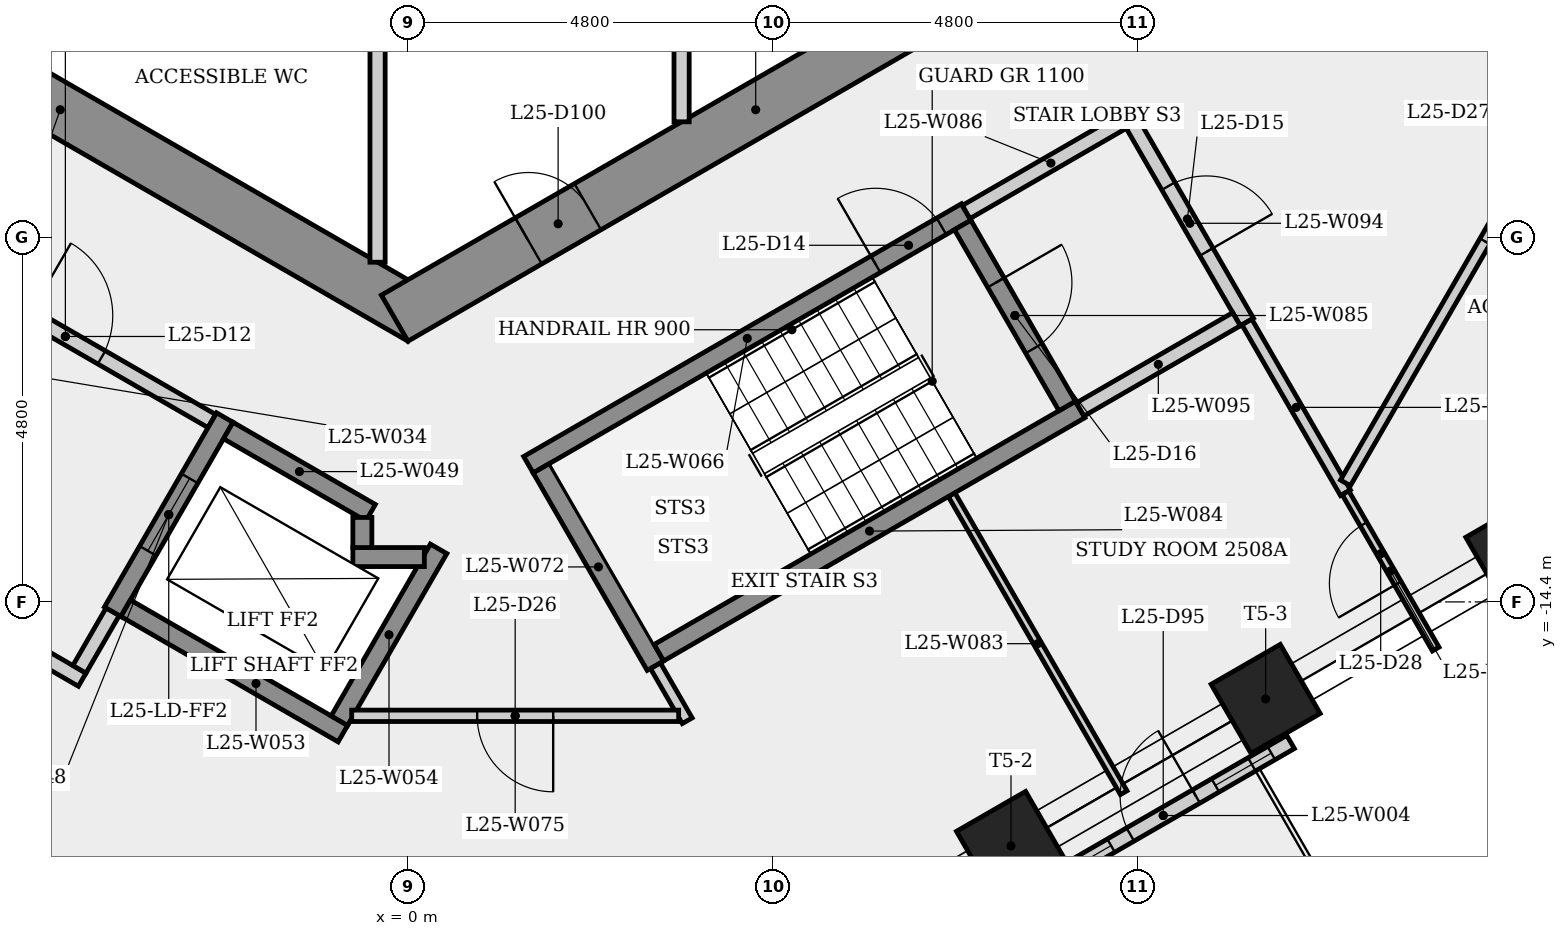
"""IFC4 building model, lengths in metres.
Left out: names, types, materials, properties, quantities, classifications, styles, units other than length and angle.
Written with IfcOpenShell. Run it as: python <this file> out.ifc"""

import sys

from ifc_helpers import new_model, si_unit, direction, frame, frame_2d, origin, origin_2d, place, context, subcontext, project, spatial, rectangle, extrude, element, fill, save


model = new_model("IFC4")
c1 = context("Model", 3, precision=1e-05, world=origin(), true_north=direction((0.0, 1.0)))
c2 = subcontext(c1, "Body", "Model", "MODEL_VIEW")
j1 = project(units=[si_unit("LENGTHUNIT", "METRE"), si_unit("PLANEANGLEUNIT", "RADIAN")], contexts=[c1])
p1 = place(None, origin())
s1 = spatial("IfcSite", under=j1, at=p1, CompositionType="ELEMENT")
p2 = place(p1, origin())
s2 = spatial("IfcBuilding", under=s1, at=p2, CompositionType="ELEMENT")
p3 = place(p2, frame((0.0, 0.0, 96.7)))
s3 = spatial("IfcBuildingStorey", under=s2, at=p3, CompositionType="ELEMENT", Elevation=96.7)
p4 = place(p3, frame((-9.325, -5.182, 0.0), z_axis=(0.0, 0.0, 1.0), x_axis=(0.866023993627, -0.500002442456, 0.0)))
e1 = element("IfcWall", 1, at=p4, inside=s3, PredefinedType="SHEAR", context=c2, shape_type="SweptSolid", body=[
    extrude(rectangle(XDim=10.97, YDim=0.7, at=frame_2d((5.485, 0.0))), origin(), (0.0, 0.0, 1.0), 3.4),
])
p5 = place(p4, frame((3.164, 0.0, 0.0)))
e2 = element("IfcOpeningElement", 2, at=p5, cuts=e1, PredefinedType="OPENING", context=c2, shape_type="SweptSolid", body=[
    extrude(rectangle(XDim=0.9, YDim=2.1, at=frame_2d((0.45, 1.05))), frame((0.0, 0.36, 0.0), z_axis=(0.0, -1.0, 0.0), x_axis=(1.0, 0.0, 0.0)), (0.0, 0.0, 1.0), 0.72),
])
p6 = place(p3, frame((-0.175, -10.667, 0.0), z_axis=(0.0, 0.0, 1.0), x_axis=(0.866023993627, 0.500002442456, 0.0)))
e3 = element("IfcWall", 3, at=p6, inside=s3, PredefinedType="SHEAR", context=c2, shape_type="SweptSolid", body=[
    extrude(rectangle(XDim=10.97, YDim=0.7, at=frame_2d((5.485, 0.0))), origin(), (0.0, 0.0, 1.0), 3.4),
])
p7 = place(p6, frame((2.033, 0.0, 0.0)))
e4 = element("IfcOpeningElement", 4, at=p7, cuts=e3, PredefinedType="OPENING", context=c2, shape_type="SweptSolid", body=[
    extrude(rectangle(XDim=0.9, YDim=2.1, at=frame_2d((0.45, 1.05))), frame((0.0, 0.36, 0.0), z_axis=(0.0, -1.0, 0.0), x_axis=(1.0, 0.0, 0.0)), (0.0, 0.0, 1.0), 0.72),
])
p8 = place(p6, frame((8.754, 0.0, 0.0)))
e5 = element("IfcOpeningElement", 5, at=p8, cuts=e3, PredefinedType="OPENING", context=c2, shape_type="SweptSolid", body=[
    extrude(rectangle(XDim=0.9, YDim=2.1, at=frame_2d((0.45, 1.05))), frame((0.0, 0.36, 0.0), z_axis=(0.0, -1.0, 0.0), x_axis=(1.0, 0.0, 0.0)), (0.0, 0.0, 1.0), 0.72),
])
for number, where, z_axis, x_axis in (
    (6, (7.934, -17.611, 0.0), (0.0, 0.0, 1.0), (0.5, -0.866, 0.0)),
    (7, (11.284, -15.677, 0.0), (0.0, 0.0, 1.0), (0.5, -0.866, 0.0)),
    (8, (14.635, -13.742, 0.0), (0.0, 0.0, 1.0), (0.5, -0.866, 0.0)),
):
    element("IfcColumn", number, at=place(p3, frame(where, z_axis=z_axis, x_axis=x_axis)), inside=s3, PredefinedType="COLUMN", context=c2, shape_type="SweptSolid", body=[
        extrude(rectangle(XDim=1.05, YDim=1.05, at=origin_2d()), origin(), (0.0, 0.0, 1.0), 3.4),
    ])
p9 = place(p3, frame((8.261, -18.178, 0.0), z_axis=(0.0, 0.0, 1.0), x_axis=(0.866040571269, 0.499973728225, 0.0)))
e9 = element("IfcWall", 9, at=p9, inside=s3, PredefinedType="SOLIDWALL", context=c2, shape_type="SweptSolid", body=[
    extrude(rectangle(XDim=3.869, YDim=0.2, at=frame_2d((1.935, 0.0))), origin(), (0.0, 0.0, 1.0), 3.4),
])
p10 = place(p9, frame((1.435, 0.0, 0.0)))
e10 = element("IfcOpeningElement", 10, at=p10, cuts=e9, PredefinedType="OPENING", context=c2, shape_type="SweptSolid", body=[
    extrude(rectangle(XDim=1.0, YDim=2.4, at=frame_2d((0.5, 1.2))), frame((0.0, 0.11, 0.0), z_axis=(0.0, -1.0, 0.0), x_axis=(1.0, 0.0, 0.0)), (0.0, 0.0, 1.0), 0.22),
])
p11 = place(p9, frame((0.292, 0.0, 0.9)))
e11 = element("IfcOpeningElement", 11, at=p11, cuts=e9, PredefinedType="OPENING", context=c2, shape_type="SweptSolid", body=[
    extrude(rectangle(XDim=0.85, YDim=1.5, at=frame_2d((0.425, 0.75))), frame((0.0, 0.11, 0.0), z_axis=(0.0, -1.0, 0.0), x_axis=(1.0, 0.0, 0.0)), (0.0, 0.0, 1.0), 0.22),
])
p12 = place(p9, frame((2.727, 0.0, 0.9)))
e12 = element("IfcOpeningElement", 12, at=p12, cuts=e9, PredefinedType="OPENING", context=c2, shape_type="SweptSolid", body=[
    extrude(rectangle(XDim=0.85, YDim=1.5, at=frame_2d((0.425, 0.75))), frame((0.0, 0.11, 0.0), z_axis=(0.0, -1.0, 0.0), x_axis=(1.0, 0.0, 0.0)), (0.0, 0.0, 1.0), 0.22),
])
p13 = place(p3, frame((-6.435, -9.795, 0.0), z_axis=(0.0, 0.0, 1.0), x_axis=(0.866012907634, -0.500021643343, 0.0)))
e13 = element("IfcWall", 13, at=p13, inside=s3, PredefinedType="PARTITIONING", context=c2, shape_type="SweptSolid", body=[
    extrude(rectangle(XDim=4.45, YDim=0.2, at=frame_2d((2.225, 0.0))), origin(), (0.0, 0.0, 1.0), 3.05),
])
p14 = place(p13, frame((1.675, 0.0, 0.0)))
e14 = element("IfcOpeningElement", 14, at=p14, cuts=e13, PredefinedType="OPENING", context=c2, shape_type="SweptSolid", body=[
    extrude(rectangle(XDim=1.1, YDim=2.1, at=frame_2d((0.55, 1.05))), frame((0.0, 0.11, 0.0), z_axis=(0.0, -1.0, 0.0), x_axis=(1.0, 0.0, 0.0)), (0.0, 0.0, 1.0), 0.22),
])
p15 = place(p3, frame((-4.286, -15.423, 0.0), z_axis=(0.0, 0.0, 1.0), x_axis=(-0.866025371046, 0.500000056704, 0.0)))
e15 = element("IfcWall", 15, at=p15, inside=s3, PredefinedType="PARTITIONING", context=c2, shape_type="SweptSolid", body=[
    extrude(rectangle(XDim=1.7, YDim=0.2, at=frame_2d((0.85, 0.0))), origin(), (0.0, 0.0, 1.0), 3.05),
])
p16 = place(p3, frame((-3.885, -14.529, 0.0), z_axis=(0.0, 0.0, 1.0), x_axis=(-0.499859285417, -0.866106630146, 0.0)))
e16 = element("IfcWall", 16, at=p16, inside=s3, PredefinedType="PARTITIONING", context=c2, shape_type="SweptSolid", body=[
    extrude(rectangle(XDim=0.875, YDim=0.2, at=frame_2d((0.438, 0.0))), origin(), (0.0, 0.0, 1.0), 3.05),
])
p17 = place(p3, frame((-2.41, -11.974, 0.0), z_axis=(0.0, 0.0, 1.0), x_axis=(-0.500001826776, -0.866024349092, 0.0)))
e17 = element("IfcWall", 17, at=p17, inside=s3, PredefinedType="SHEAR", context=c2, shape_type="SweptSolid", body=[
    extrude(rectangle(XDim=2.95, YDim=0.25, at=frame_2d((1.475, 0.0))), origin(), (0.0, 0.0, 1.0), 3.05),
])
p18 = place(p17, frame((0.925, 0.0, 0.0)))
e18 = element("IfcOpeningElement", 18, at=p18, cuts=e17, PredefinedType="OPENING", context=c2, shape_type="SweptSolid", body=[
    extrude(rectangle(XDim=1.1, YDim=2.1, at=frame_2d((0.55, 1.05))), frame((0.0, 0.135, 0.0), z_axis=(0.0, -1.0, 0.0), x_axis=(1.0, 0.0, 0.0)), (0.0, 0.0, 1.0), 0.27),
])
p19 = place(p3, frame((-2.364, -12.145, 0.0), z_axis=(0.0, 0.0, 1.0), x_axis=(0.86603892542, -0.499976579108, 0.0)))
e19 = element("IfcWall", 19, at=p19, inside=s3, PredefinedType="SHEAR", context=c2, shape_type="SweptSolid", body=[
    extrude(rectangle(XDim=2.162, YDim=0.25, at=frame_2d((1.081, 0.0))), origin(), (0.0, 0.0, 1.0), 3.05),
])
p20 = place(p3, frame((-0.856, -16.133, 0.0), z_axis=(0.0, 0.0, 1.0), x_axis=(-0.866021716278, 0.500006386895, 0.0)))
e20 = element("IfcWall", 20, at=p20, inside=s3, PredefinedType="SHEAR", context=c2, shape_type="SweptSolid", body=[
    extrude(rectangle(XDim=3.3, YDim=0.25, at=frame_2d((1.65, 0.0))), origin(), (0.0, 0.0, 1.0), 3.05),
])
p21 = place(p3, frame((-0.902, -15.962, 0.0), z_axis=(0.0, 0.0, 1.0), x_axis=(0.499981517636, 0.866036074319, 0.0)))
e21 = element("IfcWall", 21, at=p21, inside=s3, PredefinedType="SHEAR", context=c2, shape_type="SweptSolid", body=[
    extrude(rectangle(XDim=2.61, YDim=0.25, at=frame_2d((1.305, 0.0))), origin(), (0.0, 0.0, 1.0), 3.05),
])
p22 = place(p3, frame((-0.725, -13.81, 0.0), z_axis=(0.0, 0.0, 1.0), x_axis=(1.0, 0.0, 0.0)))
e22 = element("IfcWall", 22, at=p22, inside=s3, PredefinedType="SHEAR", context=c2, shape_type="SweptSolid", body=[
    extrude(rectangle(XDim=0.941, YDim=0.25, at=frame_2d((0.47, 0.0))), origin(), (0.0, 0.0, 1.0), 3.4),
])
p23 = place(p3, frame((-0.6, -13.289, 0.0), z_axis=(0.0, 0.0, 1.0), x_axis=(0.0, -1.0, 0.0)))
e23 = element("IfcWall", 23, at=p23, inside=s3, PredefinedType="SHEAR", context=c2, shape_type="SweptSolid", body=[
    extrude(rectangle(XDim=0.396, YDim=0.25, at=frame_2d((0.198, 0.0))), origin(), (0.0, 0.0, 1.0), 3.4),
])
p24 = place(p3, frame((-0.4, -5.275, 0.0), z_axis=(0.0, 0.0, 1.0), x_axis=(0.0, -1.0, 0.0)))
e24 = element("IfcWall", 24, at=p24, inside=s3, PredefinedType="PARTITIONING", context=c2, shape_type="SweptSolid", body=[
    extrude(rectangle(XDim=4.656, YDim=0.2, at=frame_2d((2.328, 0.0))), origin(), (0.0, 0.0, 1.0), 3.05),
])
p25 = place(p3, frame((1.585, -12.595, 0.0), z_axis=(0.0, 0.0, 1.0), x_axis=(0.866036417653, 0.499980922934, 0.0)))
e25 = element("IfcWall", 25, at=p25, inside=s3, PredefinedType="SHEAR", context=c2, shape_type="SweptSolid", body=[
    extrude(rectangle(XDim=6.65, YDim=0.25, at=frame_2d((3.325, 0.0))), origin(), (0.0, 0.0, 1.0), 3.05),
])
p26 = place(p25, frame((5.275, 0.0, 0.0)))
e26 = element("IfcOpeningElement", 26, at=p26, cuts=e25, PredefinedType="OPENING", context=c2, shape_type="SweptSolid", body=[
    extrude(rectangle(XDim=1.0, YDim=2.1, at=frame_2d((0.5, 1.05))), frame((0.0, 0.135, 0.0), z_axis=(0.0, -1.0, 0.0), x_axis=(1.0, 0.0, 0.0)), (0.0, 0.0, 1.0), 0.27),
])
p27 = place(p3, frame((3.256, -15.239, 0.0), z_axis=(0.0, 0.0, 1.0), x_axis=(0.499840262897, -0.866117608404, 0.0)))
e27 = element("IfcWall", 27, at=p27, inside=s3, PredefinedType="PARTITIONING", context=c2, shape_type="SweptSolid", body=[
    extrude(rectangle(XDim=0.837, YDim=0.15, at=frame_2d((0.418, 0.0))), origin(), (0.0, 0.0, 1.0), 3.05),
])
p28 = place(p3, frame((3.256, -15.239, 0.0), z_axis=(0.0, 0.0, 1.0), x_axis=(-0.50002537861, 0.866010750942, 0.0)))
e28 = element("IfcWall", 28, at=p28, inside=s3, PredefinedType="SHEAR", context=c2, shape_type="SweptSolid", body=[
    extrude(rectangle(XDim=3.0, YDim=0.25, at=frame_2d((1.5, 0.0))), origin(), (0.0, 0.0, 1.0), 3.05),
])
p29 = place(p3, frame((3.6, -5.275, 0.0), z_axis=(0.0, 0.0, 1.0), x_axis=(0.0, -1.0, 0.0)))
e29 = element("IfcWall", 29, at=p29, inside=s3, PredefinedType="PARTITIONING", context=c2, shape_type="SweptSolid", body=[
    extrude(rectangle(XDim=2.808, YDim=0.2, at=frame_2d((1.404, 0.0))), origin(), (0.0, 0.0, 1.0), 3.05),
])
p30 = place(p3, frame((3.562, -15.899, 0.0), z_axis=(0.0, 0.0, 1.0), x_axis=(-1.0, 0.0, 0.0)))
e30 = element("IfcWall", 30, at=p30, inside=s3, PredefinedType="PARTITIONING", context=c2, shape_type="SweptSolid", body=[
    extrude(rectangle(XDim=4.302, YDim=0.15, at=frame_2d((2.151, 0.0))), origin(), (0.0, 0.0, 1.0), 3.05),
])
p31 = place(p30, frame((1.651, 0.0, 0.0)))
e31 = element("IfcOpeningElement", 31, at=p31, cuts=e30, PredefinedType="OPENING", context=c2, shape_type="SweptSolid", body=[
    extrude(rectangle(XDim=1.0, YDim=2.1, at=frame_2d((0.5, 1.05))), frame((0.0, 0.085, 0.0), z_axis=(0.0, -1.0, 0.0), x_axis=(1.0, 0.0, 0.0)), (0.0, 0.0, 1.0), 0.17),
])
p32 = place(p3, frame((7.153, -12.989, 0.0), z_axis=(0.0, 0.0, 1.0), x_axis=(0.500000914898, -0.866024875567, 0.0)))
e32 = element("IfcWall", 32, at=p32, inside=s3, PredefinedType="PARTITIONING", context=c2, shape_type="SweptSolid", body=[
    extrude(rectangle(XDim=4.528, YDim=0.1, at=frame_2d((2.264, 0.0))), origin(), (0.0, 0.0, 1.0), 3.05),
])
p33 = place(p3, frame((3.301, -15.068, 0.0), z_axis=(0.0, 0.0, 1.0), x_axis=(0.866035036182, 0.499983315828, 0.0)))
e33 = element("IfcWall", 33, at=p33, inside=s3, PredefinedType="SHEAR", context=c2, shape_type="SweptSolid", body=[
    extrude(rectangle(XDim=6.4, YDim=0.25, at=frame_2d((3.2, 0.0))), origin(), (0.0, 0.0, 1.0), 3.05),
])
p34 = place(p3, frame((7.298, -9.441, 0.0), z_axis=(0.0, 0.0, 1.0), x_axis=(0.500034990121, -0.866005201286, 0.0)))
e34 = element("IfcWall", 34, at=p34, inside=s3, PredefinedType="SHEAR", context=c2, shape_type="SweptSolid", body=[
    extrude(rectangle(XDim=2.75, YDim=0.25, at=frame_2d((1.375, 0.0))), origin(), (0.0, 0.0, 1.0), 3.05),
])
p35 = place(p34, frame((0.875, 0.0, 0.0)))
e35 = element("IfcOpeningElement", 35, at=p35, cuts=e34, PredefinedType="OPENING", context=c2, shape_type="SweptSolid", body=[
    extrude(rectangle(XDim=1.0, YDim=2.1, at=frame_2d((0.5, 1.05))), frame((0.0, 0.135, 0.0), z_axis=(0.0, -1.0, 0.0), x_axis=(1.0, 0.0, 0.0)), (0.0, 0.0, 1.0), 0.27),
])
p36 = place(p3, frame((7.344, -9.27, 0.0), z_axis=(0.0, 0.0, 1.0), x_axis=(0.866005588531, 0.500034319456, 0.0)))
e36 = element("IfcWall", 36, at=p36, inside=s3, PredefinedType="PARTITIONING", context=c2, shape_type="SweptSolid", body=[
    extrude(rectangle(XDim=2.575, YDim=0.2, at=frame_2d((1.288, 0.0))), origin(), (0.0, 0.0, 1.0), 3.05),
])
p37 = place(p3, frame((9.537, -8.119, 0.0), z_axis=(0.0, 0.0, 1.0), x_axis=(0.499990139034, -0.866031096941, 0.0)))
e37 = element("IfcWall", 37, at=p37, inside=s3, PredefinedType="PARTITIONING", context=c2, shape_type="SweptSolid", body=[
    extrude(rectangle(XDim=3.0, YDim=0.2, at=frame_2d((1.5, 0.0))), origin(), (0.0, 0.0, 1.0), 3.05),
])
p38 = place(p37, frame((0.935, 0.0, 0.0)))
e38 = element("IfcOpeningElement", 38, at=p38, cuts=e37, PredefinedType="OPENING", context=c2, shape_type="SweptSolid", body=[
    extrude(rectangle(XDim=1.0, YDim=2.1, at=frame_2d((0.5, 1.05))), frame((0.0, 0.11, 0.0), z_axis=(0.0, -1.0, 0.0), x_axis=(1.0, 0.0, 0.0)), (0.0, 0.0, 1.0), 0.22),
])
p39 = place(p3, frame((10.901, -10.681, 0.0), z_axis=(0.0, 0.0, 1.0), x_axis=(-0.866007538022, -0.500030943131, 0.0)))
e39 = element("IfcWall", 39, at=p39, inside=s3, PredefinedType="PARTITIONING", context=c2, shape_type="SweptSolid", body=[
    extrude(rectangle(XDim=2.375, YDim=0.2, at=frame_2d((1.188, 0.0))), origin(), (0.0, 0.0, 1.0), 3.05),
])
p40 = place(p3, frame((12.334, -12.964, 0.0), z_axis=(0.0, 0.0, 1.0), x_axis=(-0.499974977939, 0.866039849796, 0.0)))
e40 = element("IfcWall", 40, at=p40, inside=s3, PredefinedType="PARTITIONING", context=c2, shape_type="SweptSolid", body=[
    extrude(rectangle(XDim=2.594, YDim=0.15, at=frame_2d((1.297, 0.0))), origin(), (0.0, 0.0, 1.0), 3.05),
])
p41 = place(p3, frame((13.522, -15.021, 0.0), z_axis=(0.0, 0.0, 1.0), x_axis=(-0.500030943131, 0.866007538022, 0.0)))
e41 = element("IfcWall", 41, at=p41, inside=s3, PredefinedType="PARTITIONING", context=c2, shape_type="SweptSolid", body=[
    extrude(rectangle(XDim=2.375, YDim=0.1, at=frame_2d((1.188, 0.0))), origin(), (0.0, 0.0, 1.0), 3.05),
])
p42 = place(p41, frame((0.998, 0.0, 0.0)))
e42 = element("IfcOpeningElement", 42, at=p42, cuts=e41, PredefinedType="OPENING", context=c2, shape_type="SweptSolid", body=[
    extrude(rectangle(XDim=0.9, YDim=2.1, at=frame_2d((0.45, 1.05))), frame((0.0, 0.06, 0.0), z_axis=(0.0, -1.0, 0.0), x_axis=(1.0, 0.0, 0.0)), (0.0, 0.0, 1.0), 0.12),
])
p43 = place(p3, frame((16.504, -5.611, 0.0), z_axis=(0.0, 0.0, 1.0), x_axis=(-0.499992746786, -0.866029591389, 0.0)))
e43 = element("IfcWall", 43, at=p43, inside=s3, PredefinedType="PARTITIONING", context=c2, shape_type="SweptSolid", body=[
    extrude(rectangle(XDim=8.34, YDim=0.15, at=frame_2d((4.17, 0.0))), origin(), (0.0, 0.0, 1.0), 3.05),
])
p44 = place(p43, frame((3.67, 0.0, 0.0)))
e44 = element("IfcOpeningElement", 44, at=p44, cuts=e43, PredefinedType="OPENING", context=c2, shape_type="SweptSolid", body=[
    extrude(rectangle(XDim=1.0, YDim=2.1, at=frame_2d((0.5, 1.05))), frame((0.0, 0.085, 0.0), z_axis=(0.0, -1.0, 0.0), x_axis=(1.0, 0.0, 0.0)), (0.0, 0.0, 1.0), 0.17),
])
p45 = place(p10, origin())
e45 = element("IfcDoor", 45, at=p45, inside=s3, OperationType="SINGLE_SWING_RIGHT", PredefinedType="DOOR", context=c2, shape_type="SweptSolid", body=[
    extrude(rectangle(XDim=1.0, YDim=2.4, at=frame_2d((0.5, 1.2))), frame((0.0, 0.025, 0.0), z_axis=(0.0, -1.0, 0.0), x_axis=(1.0, 0.0, 0.0)), (0.0, 0.0, 1.0), 0.05),
])
fill(e10, e45)
p46 = place(p11, origin())
e46 = element("IfcWindow", 46, at=p46, inside=s3, PartitioningType="SINGLE_PANEL", PredefinedType="WINDOW", context=c2, shape_type="SweptSolid", body=[
    extrude(rectangle(XDim=0.85, YDim=1.5, at=frame_2d((0.425, 0.75))), frame((0.0, 0.03, 0.0), z_axis=(0.0, -1.0, 0.0), x_axis=(1.0, 0.0, 0.0)), (0.0, 0.0, 1.0), 0.06),
])
fill(e11, e46)
p47 = place(p12, origin())
e47 = element("IfcWindow", 47, at=p47, inside=s3, PartitioningType="SINGLE_PANEL", PredefinedType="WINDOW", context=c2, shape_type="SweptSolid", body=[
    extrude(rectangle(XDim=0.85, YDim=1.5, at=frame_2d((0.425, 0.75))), frame((0.0, 0.03, 0.0), z_axis=(0.0, -1.0, 0.0), x_axis=(1.0, 0.0, 0.0)), (0.0, 0.0, 1.0), 0.06),
])
fill(e12, e47)
p48 = place(p14, origin())
e48 = element("IfcDoor", 48, at=p48, inside=s3, OperationType="SINGLE_SWING_LEFT", PredefinedType="DOOR", context=c2, shape_type="SweptSolid", body=[
    extrude(rectangle(XDim=1.1, YDim=2.1, at=frame_2d((0.55, 1.05))), frame((0.0, 0.025, 0.0), z_axis=(0.0, -1.0, 0.0), x_axis=(1.0, 0.0, 0.0)), (0.0, 0.0, 1.0), 0.05),
])
fill(e14, e48)
p49 = place(p18, origin())
e49 = element("IfcDoor", 49, at=p49, inside=s3, OperationType="SLIDING_TO_LEFT", PredefinedType="DOOR", context=c2, shape_type="SweptSolid", body=[
    extrude(rectangle(XDim=1.1, YDim=2.1, at=frame_2d((0.55, 1.05))), frame((0.0, 0.025, 0.0), z_axis=(0.0, -1.0, 0.0), x_axis=(1.0, 0.0, 0.0)), (0.0, 0.0, 1.0), 0.05),
])
fill(e18, e49)
p50 = place(p26, origin())
e50 = element("IfcDoor", 50, at=p50, inside=s3, OperationType="SINGLE_SWING_LEFT", PredefinedType="DOOR", context=c2, shape_type="SweptSolid", body=[
    extrude(rectangle(XDim=1.0, YDim=2.1, at=frame_2d((0.5, 1.05))), frame((0.0, 0.025, 0.0), z_axis=(0.0, -1.0, 0.0), x_axis=(1.0, 0.0, 0.0)), (0.0, 0.0, 1.0), 0.05),
])
fill(e26, e50)
p51 = place(p38, origin())
e51 = element("IfcDoor", 51, at=p51, inside=s3, OperationType="SINGLE_SWING_RIGHT", PredefinedType="DOOR", context=c2, shape_type="SweptSolid", body=[
    extrude(rectangle(XDim=1.0, YDim=2.1, at=frame_2d((0.5, 1.05))), frame((0.0, 0.025, 0.0), z_axis=(0.0, -1.0, 0.0), x_axis=(1.0, 0.0, 0.0)), (0.0, 0.0, 1.0), 0.05),
])
fill(e38, e51)
p52 = place(p35, origin())
e52 = element("IfcDoor", 52, at=p52, inside=s3, OperationType="SINGLE_SWING_LEFT", PredefinedType="DOOR", context=c2, shape_type="SweptSolid", body=[
    extrude(rectangle(XDim=1.0, YDim=2.1, at=frame_2d((0.5, 1.05))), frame((0.0, 0.025, 0.0), z_axis=(0.0, -1.0, 0.0), x_axis=(1.0, 0.0, 0.0)), (0.0, 0.0, 1.0), 0.05),
])
fill(e35, e52)
p53 = place(p31, origin())
e53 = element("IfcDoor", 53, at=p53, inside=s3, OperationType="SINGLE_SWING_LEFT", PredefinedType="DOOR", context=c2, shape_type="SweptSolid", body=[
    extrude(rectangle(XDim=1.0, YDim=2.1, at=frame_2d((0.5, 1.05))), frame((0.0, 0.025, 0.0), z_axis=(0.0, -1.0, 0.0), x_axis=(1.0, 0.0, 0.0)), (0.0, 0.0, 1.0), 0.05),
])
fill(e31, e53)
p54 = place(p44, origin())
e54 = element("IfcDoor", 54, at=p54, inside=s3, OperationType="SINGLE_SWING_RIGHT", PredefinedType="DOOR", context=c2, shape_type="SweptSolid", body=[
    extrude(rectangle(XDim=1.0, YDim=2.1, at=frame_2d((0.5, 1.05))), frame((0.0, 0.025, 0.0), z_axis=(0.0, -1.0, 0.0), x_axis=(1.0, 0.0, 0.0)), (0.0, 0.0, 1.0), 0.05),
])
fill(e44, e54)
p55 = place(p42, origin())
e55 = element("IfcDoor", 55, at=p55, inside=s3, OperationType="SINGLE_SWING_LEFT", PredefinedType="DOOR", context=c2, shape_type="SweptSolid", body=[
    extrude(rectangle(XDim=0.9, YDim=2.1, at=frame_2d((0.45, 1.05))), frame((0.0, 0.025, 0.0), z_axis=(0.0, -1.0, 0.0), x_axis=(1.0, 0.0, 0.0)), (0.0, 0.0, 1.0), 0.05),
])
fill(e42, e55)
p56 = place(p7, origin())
e56 = element("IfcDoor", 56, at=p56, inside=s3, OperationType="SINGLE_SWING_LEFT", PredefinedType="DOOR", context=c2, shape_type="SweptSolid", body=[
    extrude(rectangle(XDim=0.9, YDim=2.1, at=frame_2d((0.45, 1.05))), frame((0.0, 0.025, 0.0), z_axis=(0.0, -1.0, 0.0), x_axis=(1.0, 0.0, 0.0)), (0.0, 0.0, 1.0), 0.05),
])
fill(e4, e56)
save(model, sys.argv[1])
